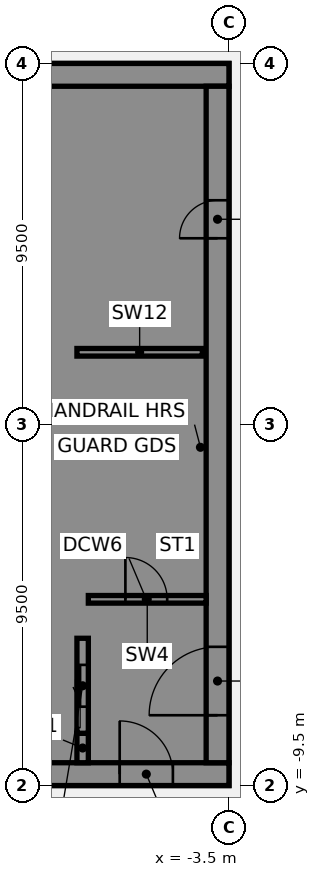
"""IFC4 building model, lengths in metres.
Left out: names, types, materials, properties, quantities, classifications, styles, units other than length and angle.
Written with IfcOpenShell. Run it as: python <this file> out.ifc"""

import sys

from ifc_helpers import new_model, si_unit, direction, frame, frame_2d, origin, place, context, subcontext, project, spatial, polyline, rectangle, outline, extrude, element, fill, save


model = new_model("IFC4")
c1 = context("Model", 3, precision=1e-05, world=origin(), true_north=direction((0.0, 1.0)))
c2 = subcontext(c1, "Body", "Model", "MODEL_VIEW")
j1 = project(units=[si_unit("LENGTHUNIT", "METRE"), si_unit("PLANEANGLEUNIT", "RADIAN")], contexts=[c1])
p1 = place(None, origin())
s1 = spatial("IfcSite", under=j1, at=p1, CompositionType="ELEMENT")
p2 = place(p1, origin())
s2 = spatial("IfcBuilding", under=s1, at=p2, CompositionType="ELEMENT")
p3 = place(p2, frame((0.0, 0.0, 166.75)))
s3 = spatial("IfcBuildingStorey", under=s2, at=p3, CompositionType="ELEMENT", Elevation=166.75)
p4 = place(p3, frame((-16.5, -9.2, 0.0), z_axis=(0.0, 0.0, 1.0), x_axis=(1.0, 0.0, 0.0)))
e1 = element("IfcWall", 1, at=p4, inside=s3, PredefinedType="SHEAR", context=c2, shape_type="SweptSolid", body=[
    extrude(rectangle(XDim=13.0, YDim=0.6, at=frame_2d((6.5, 0.0))), origin(), (0.0, 0.0, 1.0), 3.61),
])
p5 = place(p4, frame((4.15, 0.0, 0.0)))
e2 = element("IfcOpeningElement", 2, at=p5, cuts=e1, PredefinedType="OPENING", context=c2, shape_type="SweptSolid", body=[
    extrude(rectangle(XDim=1.4, YDim=2.1, at=frame_2d((0.7, 1.05))), frame((0.0, 0.31, 0.0), z_axis=(0.0, -1.0, 0.0), x_axis=(1.0, 0.0, 0.0)), (0.0, 0.0, 1.0), 0.62),
])
p6 = place(p4, frame((10.125, 0.0, 0.0)))
e3 = element("IfcOpeningElement", 3, at=p6, cuts=e1, PredefinedType="OPENING", context=c2, shape_type="SweptSolid", body=[
    extrude(rectangle(XDim=1.4, YDim=2.1, at=frame_2d((0.7, 1.05))), frame((0.0, 0.31, 0.0), z_axis=(0.0, -1.0, 0.0), x_axis=(1.0, 0.0, 0.0)), (0.0, 0.0, 1.0), 0.62),
])
p7 = place(p3, frame((-16.5, 9.2, 0.0), z_axis=(0.0, 0.0, 1.0), x_axis=(1.0, 0.0, 0.0)))
e4 = element("IfcWall", 4, at=p7, inside=s3, PredefinedType="SHEAR", context=c2, shape_type="SweptSolid", body=[
    extrude(rectangle(XDim=13.0, YDim=0.6, at=frame_2d((6.5, 0.0))), origin(), (0.0, 0.0, 1.0), 3.61),
])
p8 = place(p3, origin())
e5 = element("IfcWall", 5, at=p8, inside=s3, PredefinedType="SHEAR", context=c2, shape_type="SweptSolid", body=[
    extrude(outline(polyline([(-9.8, -5.375), (-9.8, -5.625), (-7.5, -5.625), (-7.2, -5.625), (-7.2, 8.9), (-7.5, 8.9), (-9.8, 8.9), (-9.8, 8.125), (-7.5, 8.125), (-7.5, 5.625), (-9.8, 5.625), (-9.8, 5.375), (-7.5, 5.375), (-7.5, 2.875), (-9.8, 2.875), (-9.8, 2.625), (-7.5, 2.625), (-7.5, 0.125), (-9.8, 0.125), (-9.8, -0.125), (-7.5, -0.125), (-7.5, -2.625), (-9.8, -2.625), (-9.8, -2.875), (-7.5, -2.875), (-7.5, -5.375), (-9.8, -5.375)])), origin(), (0.0, 0.0, 1.0), 3.61),
])
p9 = place(p3, origin())
e6 = element("IfcWall", 6, at=p9, inside=s3, PredefinedType="SHEAR", context=c2, shape_type="SweptSolid", body=[
    extrude(outline(polyline([(-7.5, -8.125), (-9.55, -8.125), (-9.55, -5.625), (-9.8, -5.625), (-9.8, -8.125), (-9.8, -8.9), (-7.5, -8.9), (-7.5, -8.125)])), origin(), (0.0, 0.0, 1.0), 3.61),
])
p10 = place(p3, frame((-7.35, -8.9, 0.0), z_axis=(0.0, 0.0, 1.0), x_axis=(0.0, 1.0, 0.0)))
e7 = element("IfcWall", 7, at=p10, inside=s3, PredefinedType="SHEAR", context=c2, shape_type="SweptSolid", body=[
    extrude(rectangle(XDim=0.775, YDim=0.3, at=frame_2d((0.387, 0.0))), origin(), (0.0, 0.0, 1.0), 3.61),
])
p11 = place(p3, frame((-7.5, 1.9, 0.0), z_axis=(0.0, 0.0, 1.0), x_axis=(1.0, 0.0, 0.0)))
e8 = element("IfcWall", 8, at=p11, inside=s3, PredefinedType="SHEAR", context=c2, shape_type="SweptSolid", body=[
    extrude(rectangle(XDim=3.3, YDim=0.2, at=frame_2d((1.65, 0.0))), origin(), (0.0, 0.0, 1.0), 3.61),
])
p12 = place(p3, frame((-7.35, -8.125, 0.0), z_axis=(0.0, 0.0, 1.0), x_axis=(0.0, 1.0, 0.0)))
e9 = element("IfcWall", 9, at=p12, inside=s3, PredefinedType="SHEAR", context=c2, shape_type="SweptSolid", body=[
    extrude(rectangle(XDim=2.5, YDim=0.3, at=frame_2d((1.25, 0.0))), origin(), (0.0, 0.0, 1.0), 3.61),
])
p13 = place(p12, frame((0.7, 0.0, 0.0)))
e10 = element("IfcOpeningElement", 10, at=p13, cuts=e9, PredefinedType="OPENING", context=c2, shape_type="SweptSolid", body=[
    extrude(rectangle(XDim=1.1, YDim=2.1, at=frame_2d((0.55, 1.05))), frame((0.0, 0.16, 0.0), z_axis=(0.0, -1.0, 0.0), x_axis=(1.0, 0.0, 0.0)), (0.0, 0.0, 1.0), 0.32),
])
p14 = place(p3, frame((-3.8, -8.9, 0.0), z_axis=(0.0, 0.0, 1.0), x_axis=(0.0, 1.0, 0.0)))
e11 = element("IfcWall", 11, at=p14, inside=s3, PredefinedType="SHEAR", context=c2, shape_type="SweptSolid", body=[
    extrude(rectangle(XDim=17.8, YDim=0.6, at=frame_2d((8.9, 0.0))), origin(), (0.0, 0.0, 1.0), 3.61),
])
p15 = place(p14, frame((1.25, 0.0, 0.0)))
e12 = element("IfcOpeningElement", 12, at=p15, cuts=e11, PredefinedType="OPENING", context=c2, shape_type="SweptSolid", body=[
    extrude(rectangle(XDim=1.8, YDim=2.1, at=frame_2d((0.9, 1.05))), frame((0.0, 0.31, 0.0), z_axis=(0.0, -1.0, 0.0), x_axis=(1.0, 0.0, 0.0)), (0.0, 0.0, 1.0), 0.62),
])
p16 = place(p14, frame((13.8, 0.0, 0.0)))
e13 = element("IfcOpeningElement", 13, at=p16, cuts=e11, PredefinedType="OPENING", context=c2, shape_type="SweptSolid", body=[
    extrude(rectangle(XDim=1.0, YDim=2.1, at=frame_2d((0.5, 1.05))), frame((0.0, 0.31, 0.0), z_axis=(0.0, -1.0, 0.0), x_axis=(1.0, 0.0, 0.0)), (0.0, 0.0, 1.0), 0.62),
])
p17 = place(p3, frame((-7.2, -4.6, 0.0), z_axis=(0.0, 0.0, 1.0), x_axis=(1.0, 0.0, 0.0)))
e14 = element("IfcWall", 14, at=p17, inside=s3, PredefinedType="SHEAR", context=c2, shape_type="SweptSolid", body=[
    extrude(rectangle(XDim=3.1, YDim=0.2, at=frame_2d((1.55, 0.0))), origin(), (0.0, 0.0, 1.0), 3.61),
])
p18 = place(p17, frame((0.975, 0.0, 0.0)))
e15 = element("IfcOpeningElement", 15, at=p18, cuts=e14, PredefinedType="OPENING", context=c2, shape_type="SweptSolid", body=[
    extrude(rectangle(XDim=1.1, YDim=2.1, at=frame_2d((0.55, 1.05))), frame((0.0, 0.11, 0.0), z_axis=(0.0, -1.0, 0.0), x_axis=(1.0, 0.0, 0.0)), (0.0, 0.0, 1.0), 0.22),
])
p19 = place(p6, origin())
e16 = element("IfcDoor", 16, at=p19, inside=s3, OperationType="SINGLE_SWING_LEFT", PredefinedType="DOOR", context=c2, shape_type="SweptSolid", body=[
    extrude(rectangle(XDim=1.4, YDim=2.1, at=frame_2d((0.7, 1.05))), frame((0.0, 0.025, 0.0), z_axis=(0.0, -1.0, 0.0), x_axis=(1.0, 0.0, 0.0)), (0.0, 0.0, 1.0), 0.05),
])
fill(e3, e16)
p20 = place(p15, origin())
e17 = element("IfcDoor", 17, at=p20, inside=s3, OperationType="SINGLE_SWING_LEFT", PredefinedType="DOOR", context=c2, shape_type="SweptSolid", body=[
    extrude(rectangle(XDim=1.8, YDim=2.1, at=frame_2d((0.9, 1.05))), frame((0.0, 0.025, 0.0), z_axis=(0.0, -1.0, 0.0), x_axis=(1.0, 0.0, 0.0)), (0.0, 0.0, 1.0), 0.05),
])
fill(e12, e17)
p21 = place(p16, origin())
e18 = element("IfcDoor", 18, at=p21, inside=s3, OperationType="SINGLE_SWING_LEFT", PredefinedType="DOOR", context=c2, shape_type="SweptSolid", body=[
    extrude(rectangle(XDim=1.0, YDim=2.1, at=frame_2d((0.5, 1.05))), frame((0.0, 0.025, 0.0), z_axis=(0.0, -1.0, 0.0), x_axis=(1.0, 0.0, 0.0)), (0.0, 0.0, 1.0), 0.05),
])
fill(e13, e18)
p22 = place(p18, origin())
e19 = element("IfcDoor", 19, at=p22, inside=s3, OperationType="SINGLE_SWING_LEFT", PredefinedType="DOOR", context=c2, shape_type="SweptSolid", body=[
    extrude(rectangle(XDim=1.1, YDim=2.1, at=frame_2d((0.55, 1.05))), frame((0.0, 0.025, 0.0), z_axis=(0.0, -1.0, 0.0), x_axis=(1.0, 0.0, 0.0)), (0.0, 0.0, 1.0), 0.05),
])
fill(e15, e19)
p23 = place(p13, origin())
e20 = element("IfcDoor", 20, at=p23, inside=s3, OperationType="SLIDING_TO_LEFT", PredefinedType="DOOR", context=c2, shape_type="SweptSolid", body=[
    extrude(rectangle(XDim=1.1, YDim=2.1, at=frame_2d((0.55, 1.05))), frame((0.0, 0.025, 0.0), z_axis=(0.0, -1.0, 0.0), x_axis=(1.0, 0.0, 0.0)), (0.0, 0.0, 1.0), 0.05),
])
fill(e10, e20)
save(model, sys.argv[1])
